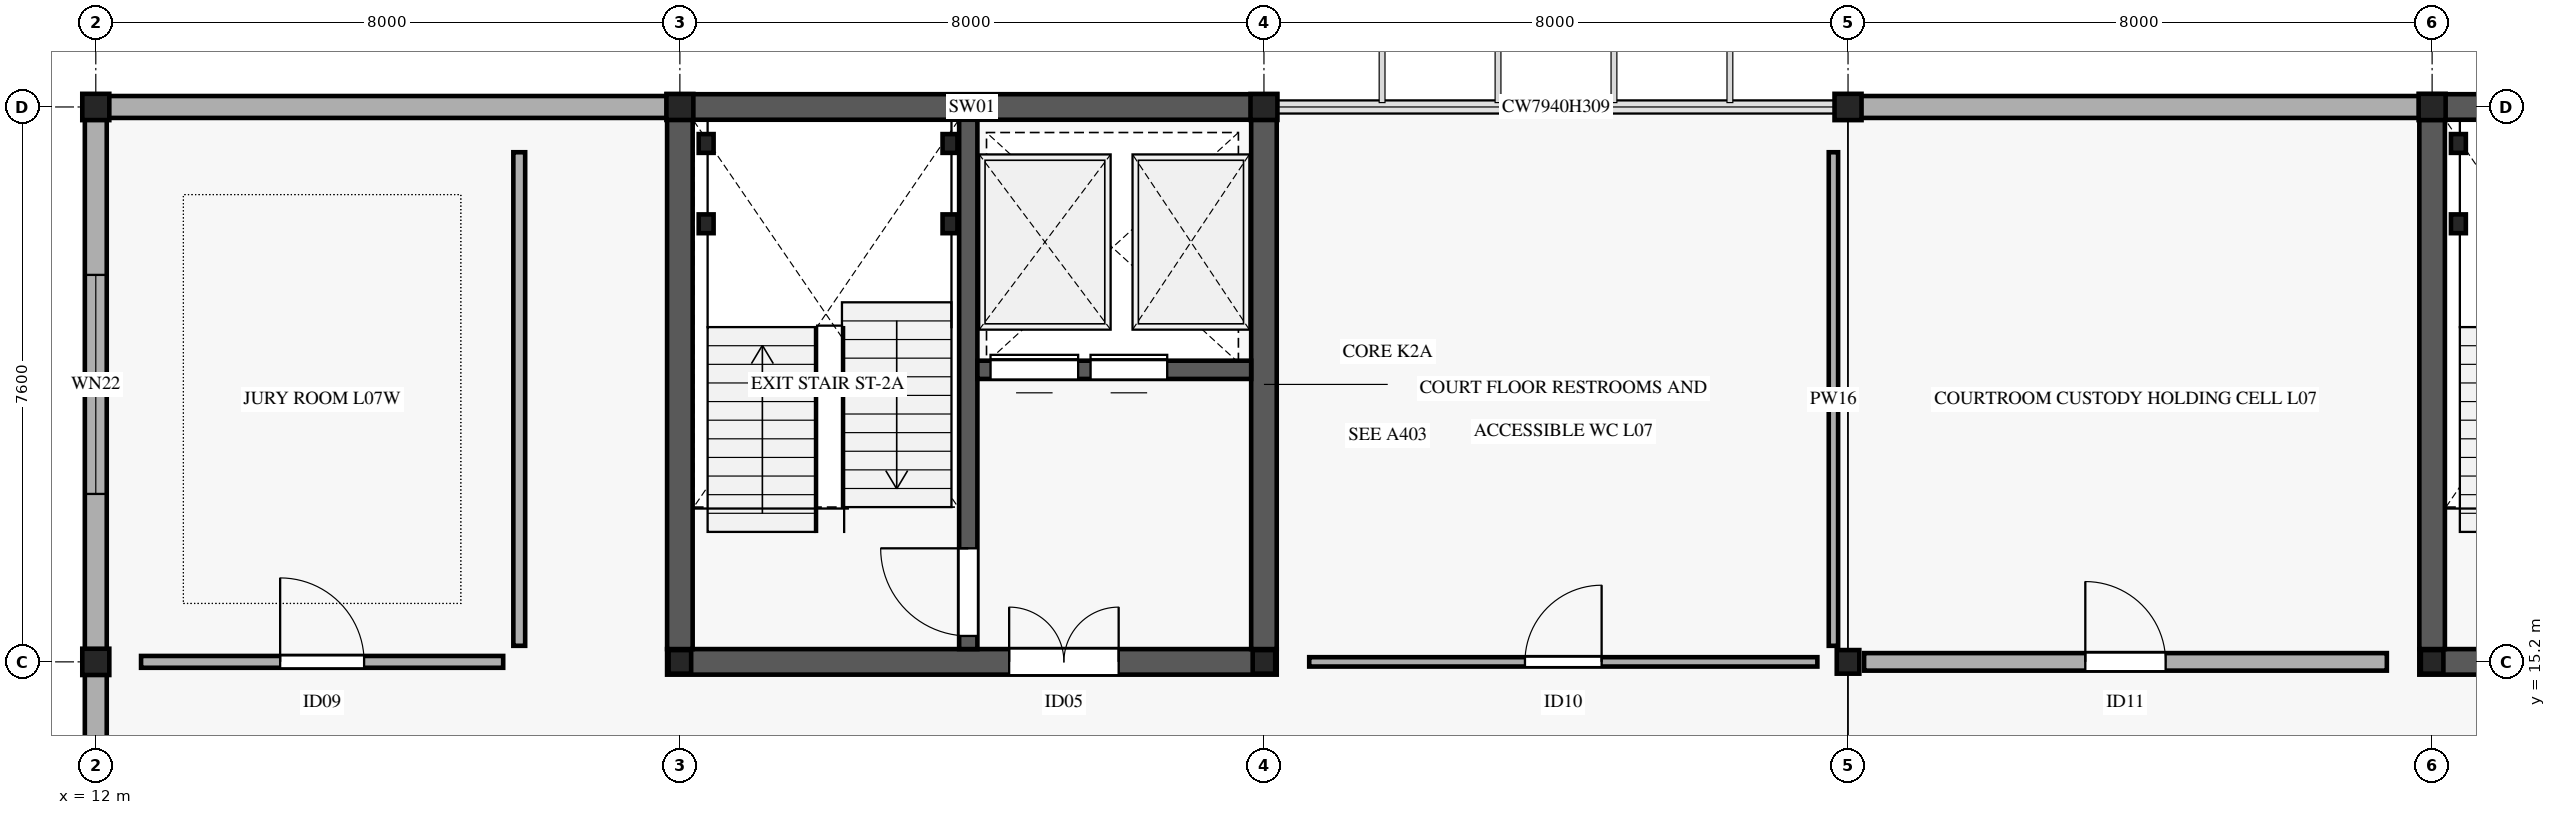
"""IFC4 building model, lengths in metres.
Left out: names, types, materials, properties, quantities, classifications, styles, units other than length and angle.
Written with IfcOpenShell. Run it as: python <this file> out.ifc"""

import sys

from ifc_helpers import new_model, si_unit, direction, frame, frame_2d, origin, origin_2d, place, context, subcontext, project, spatial, rectangle, i_section, extrude, element, fill, save


model = new_model("IFC4")
c1 = context("Model", 3, precision=1e-05, world=origin(), true_north=direction((0.0, 1.0)))
c2 = subcontext(c1, "Body", "Model", "MODEL_VIEW")
j1 = project(units=[si_unit("LENGTHUNIT", "METRE"), si_unit("PLANEANGLEUNIT", "RADIAN")], contexts=[c1])
p1 = place(None, origin())
s1 = spatial("IfcSite", under=j1, at=p1, CompositionType="ELEMENT")
p2 = place(p1, origin())
s2 = spatial("IfcBuilding", under=s1, at=p2, CompositionType="ELEMENT")
p3 = place(p2, frame((0.0, 0.0, 33.6)))
s3 = spatial("IfcBuildingStorey", under=s2, at=p3, CompositionType="ELEMENT", Elevation=33.6)
for number, where, z_axis, x_axis in (
    (1, (12.0, 15.2, 0.0), (0.0, 0.0, 1.0), (1.0, 0.0, 0.0)),
    (2, (12.0, 22.8, 0.0), (0.0, 0.0, 1.0), (1.0, 0.0, 0.0)),
):
    element("IfcColumn", number, at=place(p3, frame(where, z_axis=z_axis, x_axis=x_axis)), inside=s3, PredefinedType="COLUMN", context=c2, shape_type="SweptSolid", body=[
        extrude(i_section(OverallWidth=0.37, OverallDepth=0.36, WebThickness=0.012, FlangeThickness=0.02, FilletRadius=0.015, at=origin_2d()), origin(), (0.0, 0.0, 1.0), 4.0),
    ])
p4 = place(p3, frame((20.0, 15.2, 0.0), z_axis=(0.0, 0.0, 1.0), x_axis=(1.0, 0.0, 0.0)))
e3 = element("IfcColumn", 3, at=p4, inside=s3, PredefinedType="COLUMN", context=c2, shape_type="SweptSolid", body=[
    extrude(i_section(OverallWidth=0.309, OverallDepth=0.323, WebThickness=0.014, FlangeThickness=0.023, FilletRadius=0.015, at=origin_2d()), origin(), (0.0, 0.0, 1.0), 4.0),
])
p5 = place(p3, frame((20.0, 22.8, 0.0), z_axis=(0.0, 0.0, 1.0), x_axis=(1.0, 0.0, 0.0)))
e4 = element("IfcColumn", 4, at=p5, inside=s3, PredefinedType="COLUMN", context=c2, shape_type="SweptSolid", body=[
    extrude(i_section(OverallWidth=0.369, OverallDepth=0.356, WebThickness=0.011, FlangeThickness=0.018, FilletRadius=0.015, at=origin_2d()), origin(), (0.0, 0.0, 1.0), 4.0),
])
p6 = place(p3, frame((28.0, 15.2, 0.0), z_axis=(0.0, 0.0, 1.0), x_axis=(1.0, 0.0, 0.0)))
e5 = element("IfcColumn", 5, at=p6, inside=s3, PredefinedType="COLUMN", context=c2, shape_type="SweptSolid", body=[
    extrude(i_section(OverallWidth=0.309, OverallDepth=0.323, WebThickness=0.014, FlangeThickness=0.023, FilletRadius=0.015, at=origin_2d()), origin(), (0.0, 0.0, 1.0), 4.0),
])
p7 = place(p3, frame((28.0, 22.8, 0.0), z_axis=(0.0, 0.0, 1.0), x_axis=(1.0, 0.0, 0.0)))
e6 = element("IfcColumn", 6, at=p7, inside=s3, PredefinedType="COLUMN", context=c2, shape_type="SweptSolid", body=[
    extrude(i_section(OverallWidth=0.369, OverallDepth=0.356, WebThickness=0.011, FlangeThickness=0.018, FilletRadius=0.015, at=origin_2d()), origin(), (0.0, 0.0, 1.0), 4.0),
])
p8 = place(p3, frame((36.0, 15.2, 0.0), z_axis=(0.0, 0.0, 1.0), x_axis=(1.0, 0.0, 0.0)))
e7 = element("IfcColumn", 7, at=p8, inside=s3, PredefinedType="COLUMN", context=c2, shape_type="SweptSolid", body=[
    extrude(i_section(OverallWidth=0.309, OverallDepth=0.323, WebThickness=0.014, FlangeThickness=0.023, FilletRadius=0.015, at=origin_2d()), origin(), (0.0, 0.0, 1.0), 4.0),
])
p9 = place(p3, frame((36.0, 22.8, 0.0), z_axis=(0.0, 0.0, 1.0), x_axis=(1.0, 0.0, 0.0)))
e8 = element("IfcColumn", 8, at=p9, inside=s3, PredefinedType="COLUMN", context=c2, shape_type="SweptSolid", body=[
    extrude(i_section(OverallWidth=0.37, OverallDepth=0.36, WebThickness=0.012, FlangeThickness=0.02, FilletRadius=0.015, at=origin_2d()), origin(), (0.0, 0.0, 1.0), 4.0),
])
p10 = place(p3, frame((44.0, 15.2, 0.0), z_axis=(0.0, 0.0, 1.0), x_axis=(1.0, 0.0, 0.0)))
e9 = element("IfcColumn", 9, at=p10, inside=s3, PredefinedType="COLUMN", context=c2, shape_type="SweptSolid", body=[
    extrude(i_section(OverallWidth=0.309, OverallDepth=0.323, WebThickness=0.014, FlangeThickness=0.023, FilletRadius=0.015, at=origin_2d()), origin(), (0.0, 0.0, 1.0), 4.0),
])
p11 = place(p3, frame((44.0, 22.8, 0.0), z_axis=(0.0, 0.0, 1.0), x_axis=(1.0, 0.0, 0.0)))
e10 = element("IfcColumn", 10, at=p11, inside=s3, PredefinedType="COLUMN", context=c2, shape_type="SweptSolid", body=[
    extrude(i_section(OverallWidth=0.37, OverallDepth=0.36, WebThickness=0.012, FlangeThickness=0.02, FilletRadius=0.015, at=origin_2d()), origin(), (0.0, 0.0, 1.0), 4.0),
])
p12 = place(p3, frame((12.0, 7.58, 0.0), z_axis=(0.0, 0.0, 1.0), x_axis=(0.0, 1.0, 0.0)))
e11 = element("IfcWall", 11, at=p12, inside=s3, PredefinedType="STANDARD", context=c2, shape_type="SweptSolid", body=[
    extrude(rectangle(XDim=7.64, YDim=0.3, at=frame_2d((3.82, 0.0))), origin(), (0.0, 0.0, 1.0), 3.06),
])
p13 = place(p12, frame((2.495, 0.0, 0.75)))
e12 = element("IfcOpeningElement", 12, at=p13, cuts=e11, PredefinedType="OPENING", context=c2, shape_type="SweptSolid", body=[
    extrude(rectangle(XDim=2.65, YDim=1.8, at=frame_2d((1.325, 0.9))), frame((0.0, 0.16, 0.0), z_axis=(0.0, -1.0, 0.0), x_axis=(1.0, 0.0, 0.0)), (0.0, 0.0, 1.0), 0.32),
])
p14 = place(p3, frame((12.0, 15.18, 0.0), z_axis=(0.0, 0.0, 1.0), x_axis=(0.0, 1.0, 0.0)))
e13 = element("IfcWall", 13, at=p14, inside=s3, PredefinedType="STANDARD", context=c2, shape_type="SweptSolid", body=[
    extrude(rectangle(XDim=7.64, YDim=0.3, at=frame_2d((3.82, 0.0))), origin(), (0.0, 0.0, 1.0), 3.06),
])
p15 = place(p14, frame((2.32, 0.0, 0.75)))
e14 = element("IfcOpeningElement", 14, at=p15, cuts=e13, PredefinedType="OPENING", context=c2, shape_type="SweptSolid", body=[
    extrude(rectangle(XDim=3.0, YDim=1.8, at=frame_2d((1.5, 0.9))), frame((0.0, 0.16, 0.0), z_axis=(0.0, -1.0, 0.0), x_axis=(1.0, 0.0, 0.0)), (0.0, 0.0, 1.0), 0.32),
])
for number, where, z_axis, x_axis in (
    (15, (11.98, 22.8, 0.0), (0.0, 0.0, 1.0), (1.0, 0.0, 0.0)),
    (16, (35.98, 22.8, 0.0), (0.0, 0.0, 1.0), (1.0, 0.0, 0.0)),
):
    element("IfcWall", number, at=place(p3, frame(where, z_axis=z_axis, x_axis=x_axis)), inside=s3, PredefinedType="STANDARD", context=c2, shape_type="SweptSolid", body=[
        extrude(rectangle(XDim=8.04, YDim=0.3, at=frame_2d((4.02, 0.0))), origin(), (0.0, 0.0, 1.0), 3.06),
    ])
p16 = place(p3, frame((19.825, 15.2, 0.0), z_axis=(0.0, 0.0, 1.0), x_axis=(1.0, 0.0, 0.0)))
e17 = element("IfcWall", 17, at=p16, inside=s3, PredefinedType="SHEAR", context=c2, shape_type="SweptSolid", body=[
    extrude(rectangle(XDim=8.35, YDim=0.35, at=frame_2d((4.175, 0.0))), origin(), (0.0, 0.0, 1.0), 3.99),
])
p17 = place(p16, frame((4.685, 0.0, 0.0)))
e18 = element("IfcOpeningElement", 18, at=p17, cuts=e17, PredefinedType="OPENING", context=c2, shape_type="SweptSolid", body=[
    extrude(rectangle(XDim=1.5, YDim=2.2, at=frame_2d((0.75, 1.1))), frame((0.0, 0.185, 0.0), z_axis=(0.0, -1.0, 0.0), x_axis=(1.0, 0.0, 0.0)), (0.0, 0.0, 1.0), 0.37),
])
p18 = place(p3, frame((19.825, 22.8, 0.0), z_axis=(0.0, 0.0, 1.0), x_axis=(1.0, 0.0, 0.0)))
e19 = element("IfcWall", 19, at=p18, inside=s3, PredefinedType="SHEAR", context=c2, shape_type="SweptSolid", body=[
    extrude(rectangle(XDim=8.35, YDim=0.35, at=frame_2d((4.175, 0.0))), origin(), (0.0, 0.0, 1.0), 3.99),
])
for number, where, z_axis, x_axis in (
    (20, (20.0, 15.375, 0.0), (0.0, 0.0, 1.0), (0.0, 1.0, 0.0)),
    (21, (28.0, 15.375, 0.0), (0.0, 0.0, 1.0), (0.0, 1.0, 0.0)),
):
    element("IfcWall", number, at=place(p3, frame(where, z_axis=z_axis, x_axis=x_axis)), inside=s3, PredefinedType="SHEAR", context=c2, shape_type="SweptSolid", body=[
        extrude(rectangle(XDim=7.25, YDim=0.35, at=frame_2d((3.625, 0.0))), origin(), (0.0, 0.0, 1.0), 3.99),
    ])
p19 = place(p3, frame((23.95, 15.375, 0.0), z_axis=(0.0, 0.0, 1.0), x_axis=(0.0, 1.0, 0.0)))
e22 = element("IfcWall", 22, at=p19, inside=s3, PredefinedType="SHEAR", context=c2, shape_type="SweptSolid", body=[
    extrude(rectangle(XDim=7.25, YDim=0.25, at=frame_2d((3.625, 0.0))), origin(), (0.0, 0.0, 1.0), 3.99),
])
p20 = place(p19, frame((0.18, 0.0, 0.0)))
e23 = element("IfcOpeningElement", 23, at=p20, cuts=e22, PredefinedType="OPENING", context=c2, shape_type="SweptSolid", body=[
    extrude(rectangle(XDim=1.2, YDim=2.2, at=frame_2d((0.6, 1.1))), frame((0.0, 0.135, 0.0), z_axis=(0.0, -1.0, 0.0), x_axis=(1.0, 0.0, 0.0)), (0.0, 0.0, 1.0), 0.27),
])
p21 = place(p3, frame((24.075, 19.2, 0.0), z_axis=(0.0, 0.0, 1.0), x_axis=(1.0, 0.0, 0.0)))
e24 = element("IfcWall", 24, at=p21, inside=s3, PredefinedType="SHEAR", context=c2, shape_type="SweptSolid", body=[
    extrude(rectangle(XDim=3.75, YDim=0.25, at=frame_2d((1.875, 0.0))), origin(), (0.0, 0.0, 1.0), 3.99),
])
p22 = place(p21, frame((0.18, 0.0, 0.0)))
e25 = element("IfcOpeningElement", 25, at=p22, cuts=e24, PredefinedType="OPENING", context=c2, shape_type="SweptSolid", body=[
    extrude(rectangle(XDim=1.2, YDim=2.2, at=frame_2d((0.6, 1.1))), frame((0.0, 0.135, 0.0), z_axis=(0.0, -1.0, 0.0), x_axis=(1.0, 0.0, 0.0)), (0.0, 0.0, 1.0), 0.27),
])
p23 = place(p21, frame((1.55, 0.0, 0.0)))
e26 = element("IfcOpeningElement", 26, at=p23, cuts=e24, PredefinedType="OPENING", context=c2, shape_type="SweptSolid", body=[
    extrude(rectangle(XDim=1.05, YDim=2.2, at=frame_2d((0.525, 1.1))), frame((0.0, 0.135, 0.0), z_axis=(0.0, -1.0, 0.0), x_axis=(1.0, 0.0, 0.0)), (0.0, 0.0, 1.0), 0.27),
])
for number, where, z_axis, x_axis in (
    (27, (20.36, 21.2, 0.0), (0.0, 0.0, 1.0), (1.0, 0.0, 0.0)),
    (28, (23.7, 21.2, 0.0), (0.0, 0.0, 1.0), (1.0, 0.0, 0.0)),
    (29, (20.36, 22.3, 0.0), (0.0, 0.0, 1.0), (1.0, 0.0, 0.0)),
    (30, (23.7, 22.3, 0.0), (0.0, 0.0, 1.0), (1.0, 0.0, 0.0)),
):
    element("IfcColumn", number, at=place(p3, frame(where, z_axis=z_axis, x_axis=x_axis)), inside=s3, PredefinedType="COLUMN", context=c2, shape_type="SweptSolid", body=[
        extrude(i_section(OverallWidth=0.204, OverallDepth=0.257, WebThickness=0.009, FlangeThickness=0.016, FilletRadius=0.013, at=origin_2d()), origin(), (0.0, 0.0, 1.0), 4.195),
    ])
p24 = place(p3, frame((43.825, 15.2, 0.0), z_axis=(0.0, 0.0, 1.0), x_axis=(1.0, 0.0, 0.0)))
e31 = element("IfcWall", 31, at=p24, inside=s3, PredefinedType="SHEAR", context=c2, shape_type="SweptSolid", body=[
    extrude(rectangle(XDim=8.35, YDim=0.35, at=frame_2d((4.175, 0.0))), origin(), (0.0, 0.0, 1.0), 3.99),
])
p25 = place(p24, frame((4.685, 0.0, 0.0)))
e32 = element("IfcOpeningElement", 32, at=p25, cuts=e31, PredefinedType="OPENING", context=c2, shape_type="SweptSolid", body=[
    extrude(rectangle(XDim=1.5, YDim=2.2, at=frame_2d((0.75, 1.1))), frame((0.0, 0.185, 0.0), z_axis=(0.0, -1.0, 0.0), x_axis=(1.0, 0.0, 0.0)), (0.0, 0.0, 1.0), 0.37),
])
p26 = place(p3, frame((43.825, 22.8, 0.0), z_axis=(0.0, 0.0, 1.0), x_axis=(1.0, 0.0, 0.0)))
e33 = element("IfcWall", 33, at=p26, inside=s3, PredefinedType="SHEAR", context=c2, shape_type="SweptSolid", body=[
    extrude(rectangle(XDim=8.35, YDim=0.35, at=frame_2d((4.175, 0.0))), origin(), (0.0, 0.0, 1.0), 3.99),
])
p27 = place(p3, frame((44.0, 15.375, 0.0), z_axis=(0.0, 0.0, 1.0), x_axis=(0.0, 1.0, 0.0)))
e34 = element("IfcWall", 34, at=p27, inside=s3, PredefinedType="SHEAR", context=c2, shape_type="SweptSolid", body=[
    extrude(rectangle(XDim=7.25, YDim=0.35, at=frame_2d((3.625, 0.0))), origin(), (0.0, 0.0, 1.0), 3.99),
])
for number, where, z_axis, x_axis in (
    (35, (44.36, 21.2, 0.0), (0.0, 0.0, 1.0), (1.0, 0.0, 0.0)),
    (36, (44.36, 22.3, 0.0), (0.0, 0.0, 1.0), (1.0, 0.0, 0.0)),
):
    element("IfcColumn", number, at=place(p3, frame(where, z_axis=z_axis, x_axis=x_axis)), inside=s3, PredefinedType="COLUMN", context=c2, shape_type="SweptSolid", body=[
        extrude(i_section(OverallWidth=0.204, OverallDepth=0.257, WebThickness=0.009, FlangeThickness=0.016, FilletRadius=0.013, at=origin_2d()), origin(), (0.0, 0.0, 1.0), 4.195),
    ])
p28 = place(p3, frame((12.62, 15.2, 0.0), z_axis=(0.0, 0.0, 1.0), x_axis=(1.0, 0.0, 0.0)))
e37 = element("IfcWall", 37, at=p28, inside=s3, PredefinedType="PARTITIONING", context=c2, shape_type="SweptSolid", body=[
    extrude(rectangle(XDim=4.96, YDim=0.162, at=frame_2d((2.48, 0.0))), origin(), (0.0, 0.0, 1.0), 2.85),
])
p29 = place(p28, frame((1.905, 0.0, 0.0)))
e38 = element("IfcOpeningElement", 38, at=p29, cuts=e37, PredefinedType="OPENING", context=c2, shape_type="SweptSolid", body=[
    extrude(rectangle(XDim=1.15, YDim=2.15, at=frame_2d((0.575, 1.075))), frame((0.0, 0.091, 0.0), z_axis=(0.0, -1.0, 0.0), x_axis=(1.0, 0.0, 0.0)), (0.0, 0.0, 1.0), 0.182),
])
p30 = place(p3, frame((17.8, 15.42, 0.0), z_axis=(0.0, 0.0, 1.0), x_axis=(0.0, 1.0, 0.0)))
e39 = element("IfcWall", 39, at=p30, inside=s3, PredefinedType="PARTITIONING", context=c2, shape_type="SweptSolid", body=[
    extrude(rectangle(XDim=6.76, YDim=0.162, at=frame_2d((3.38, 0.0))), origin(), (0.0, 0.0, 1.0), 2.85),
])
p31 = place(p3, frame((28.62, 15.2, 0.0), z_axis=(0.0, 0.0, 1.0), x_axis=(1.0, 0.0, 0.0)))
e40 = element("IfcWall", 40, at=p31, inside=s3, PredefinedType="PARTITIONING", context=c2, shape_type="SweptSolid", body=[
    extrude(rectangle(XDim=6.96, YDim=0.128, at=frame_2d((3.48, 0.0))), origin(), (0.0, 0.0, 1.0), 2.85),
])
p32 = place(p31, frame((2.955, 0.0, 0.0)))
e41 = element("IfcOpeningElement", 41, at=p32, cuts=e40, PredefinedType="OPENING", context=c2, shape_type="SweptSolid", body=[
    extrude(rectangle(XDim=1.05, YDim=2.15, at=frame_2d((0.525, 1.075))), frame((0.0, 0.074, 0.0), z_axis=(0.0, -1.0, 0.0), x_axis=(1.0, 0.0, 0.0)), (0.0, 0.0, 1.0), 0.148),
])
p33 = place(p3, frame((35.8, 15.42, 0.0), z_axis=(0.0, 0.0, 1.0), x_axis=(0.0, 1.0, 0.0)))
e42 = element("IfcWall", 42, at=p33, inside=s3, PredefinedType="PARTITIONING", context=c2, shape_type="SweptSolid", body=[
    extrude(rectangle(XDim=6.76, YDim=0.128, at=frame_2d((3.38, 0.0))), origin(), (0.0, 0.0, 1.0), 2.85),
])
p34 = place(p3, frame((36.22, 15.2, 0.0), z_axis=(0.0, 0.0, 1.0), x_axis=(1.0, 0.0, 0.0)))
e43 = element("IfcWall", 43, at=p34, inside=s3, PredefinedType="PARTITIONING", context=c2, shape_type="SweptSolid", body=[
    extrude(rectangle(XDim=7.16, YDim=0.24, at=frame_2d((3.58, 0.0))), origin(), (0.0, 0.0, 1.0), 2.85),
])
p35 = place(p34, frame((3.03, 0.0, 0.0)))
e44 = element("IfcOpeningElement", 44, at=p35, cuts=e43, PredefinedType="OPENING", context=c2, shape_type="SweptSolid", body=[
    extrude(rectangle(XDim=1.1, YDim=2.3, at=frame_2d((0.55, 1.15))), frame((0.0, 0.13, 0.0), z_axis=(0.0, -1.0, 0.0), x_axis=(1.0, 0.0, 0.0)), (0.0, 0.0, 1.0), 0.26),
])
p36 = place(p15, origin())
e45 = element("IfcWindow", 45, at=p36, inside=s3, PartitioningType="SINGLE_PANEL", PredefinedType="WINDOW", context=c2, shape_type="SweptSolid", body=[
    extrude(rectangle(XDim=3.0, YDim=1.8, at=frame_2d((1.5, 0.9))), frame((0.0, 0.03, 0.0), z_axis=(0.0, -1.0, 0.0), x_axis=(1.0, 0.0, 0.0)), (0.0, 0.0, 1.0), 0.06),
])
fill(e14, e45)
p37 = place(p20, origin())
e46 = element("IfcDoor", 46, at=p37, inside=s3, OperationType="SINGLE_SWING_RIGHT", PredefinedType="DOOR", context=c2, shape_type="SweptSolid", body=[
    extrude(rectangle(XDim=1.2, YDim=2.2, at=frame_2d((0.6, 1.1))), frame((0.0, 0.025, 0.0), z_axis=(0.0, -1.0, 0.0), x_axis=(1.0, 0.0, 0.0)), (0.0, 0.0, 1.0), 0.05),
])
fill(e23, e46)
p38 = place(p17, origin())
e47 = element("IfcDoor", 47, at=p38, inside=s3, OperationType="DOUBLE_DOOR_SINGLE_SWING", PredefinedType="DOOR", context=c2, shape_type="SweptSolid", body=[
    extrude(rectangle(XDim=1.5, YDim=2.2, at=frame_2d((0.75, 1.1))), frame((0.0, 0.025, 0.0), z_axis=(0.0, -1.0, 0.0), x_axis=(1.0, 0.0, 0.0)), (0.0, 0.0, 1.0), 0.05),
])
fill(e18, e47)
p39 = place(p22, origin())
e48 = element("IfcDoor", 48, at=p39, inside=s3, OperationType="SLIDING_TO_LEFT", PredefinedType="DOOR", context=c2, shape_type="SweptSolid", body=[
    extrude(rectangle(XDim=1.2, YDim=2.2, at=frame_2d((0.6, 1.1))), frame((0.0, 0.025, 0.0), z_axis=(0.0, -1.0, 0.0), x_axis=(1.0, 0.0, 0.0)), (0.0, 0.0, 1.0), 0.05),
])
fill(e25, e48)
p40 = place(p23, origin())
e49 = element("IfcDoor", 49, at=p40, inside=s3, OperationType="SLIDING_TO_RIGHT", PredefinedType="DOOR", context=c2, shape_type="SweptSolid", body=[
    extrude(rectangle(XDim=1.05, YDim=2.2, at=frame_2d((0.525, 1.1))), frame((0.0, 0.025, 0.0), z_axis=(0.0, -1.0, 0.0), x_axis=(1.0, 0.0, 0.0)), (0.0, 0.0, 1.0), 0.05),
])
fill(e26, e49)
p41 = place(p29, origin())
e50 = element("IfcDoor", 50, at=p41, inside=s3, OperationType="SINGLE_SWING_LEFT", PredefinedType="DOOR", context=c2, shape_type="SweptSolid", body=[
    extrude(rectangle(XDim=1.15, YDim=2.15, at=frame_2d((0.575, 1.075))), frame((0.0, 0.025, 0.0), z_axis=(0.0, -1.0, 0.0), x_axis=(1.0, 0.0, 0.0)), (0.0, 0.0, 1.0), 0.05),
])
fill(e38, e50)
p42 = place(p32, origin())
e51 = element("IfcDoor", 51, at=p42, inside=s3, OperationType="SINGLE_SWING_RIGHT", PredefinedType="DOOR", context=c2, shape_type="SweptSolid", body=[
    extrude(rectangle(XDim=1.05, YDim=2.15, at=frame_2d((0.525, 1.075))), frame((0.0, 0.025, 0.0), z_axis=(0.0, -1.0, 0.0), x_axis=(1.0, 0.0, 0.0)), (0.0, 0.0, 1.0), 0.05),
])
fill(e41, e51)
p43 = place(p35, origin())
e52 = element("IfcDoor", 52, at=p43, inside=s3, OperationType="SINGLE_SWING_LEFT", PredefinedType="DOOR", context=c2, shape_type="SweptSolid", body=[
    extrude(rectangle(XDim=1.1, YDim=2.3, at=frame_2d((0.55, 1.15))), frame((0.0, 0.025, 0.0), z_axis=(0.0, -1.0, 0.0), x_axis=(1.0, 0.0, 0.0)), (0.0, 0.0, 1.0), 0.05),
])
fill(e44, e52)
save(model, sys.argv[1])
